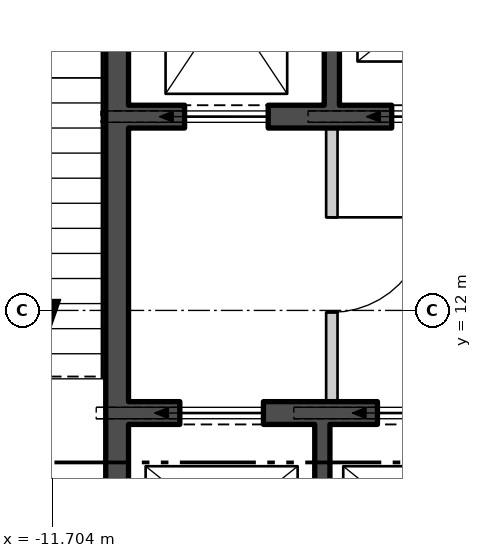
"""IFC4 building model, lengths in metres.
Left out: names, types, materials, properties, quantities, classifications, styles, units other than length and angle.
Written with IfcOpenShell. Run it as: python <this file> out.ifc"""

import sys

from ifc_helpers import new_model, si_unit, direction, frame, frame_2d, origin, place, context, subcontext, project, spatial, polyline, rectangle, outline, extrude, element, fill, save


model = new_model("IFC4")
c1 = context("Model", 3, precision=1e-05, world=origin(), true_north=direction((0.0, 1.0)))
c2 = subcontext(c1, "Body", "Model", "MODEL_VIEW")
j1 = project(units=[si_unit("LENGTHUNIT", "METRE"), si_unit("PLANEANGLEUNIT", "RADIAN")], contexts=[c1])
p1 = place(None, origin())
s1 = spatial("IfcSite", under=j1, at=p1, CompositionType="ELEMENT")
p2 = place(p1, origin())
s2 = spatial("IfcBuilding", under=s1, at=p2, CompositionType="ELEMENT")
p3 = place(p2, frame((0.0, 0.0, 163.2)))
s3 = spatial("IfcBuildingStorey", under=s2, at=p3, CompositionType="ELEMENT", Elevation=163.2)
p4 = place(p3, frame((-26.925, 12.951, -0.18), z_axis=(0.0, 0.0, 1.0), x_axis=(0.499999764979, -0.866025539474, 0.0)))
e1 = element("IfcWall", 1, at=p4, inside=s3, PredefinedType="SOLIDWALL", context=c2, shape_type="SweptSolid", body=[
    extrude(outline(polyline([(-0.13, -0.225), (45.87, -0.225), (45.61, 0.225), (0.13, 0.225), (-0.13, -0.225)])), origin(), (0.0, 0.0, 1.0), 3.68),
])
p5 = place(p4, frame((1.424, 0.0, 1.08)))
e2 = element("IfcOpeningElement", 2, at=p5, cuts=e1, PredefinedType="OPENING", context=c2, shape_type="SweptSolid", body=[
    extrude(rectangle(XDim=2.4, YDim=2.0, at=frame_2d((1.2, 1.0))), frame((0.0, 0.235, 0.0), z_axis=(0.0, -1.0, 0.0), x_axis=(1.0, 0.0, 0.0)), (0.0, 0.0, 1.0), 0.47),
])
p6 = place(p4, frame((5.893, 0.0, 1.08)))
e3 = element("IfcOpeningElement", 3, at=p6, cuts=e1, PredefinedType="OPENING", context=c2, shape_type="SweptSolid", body=[
    extrude(rectangle(XDim=2.4, YDim=2.0, at=frame_2d((1.2, 1.0))), frame((0.0, 0.235, 0.0), z_axis=(0.0, -1.0, 0.0), x_axis=(1.0, 0.0, 0.0)), (0.0, 0.0, 1.0), 0.47),
])
p7 = place(p4, frame((10.401, 0.0, 1.08)))
e4 = element("IfcOpeningElement", 4, at=p7, cuts=e1, PredefinedType="OPENING", context=c2, shape_type="SweptSolid", body=[
    extrude(rectangle(XDim=2.4, YDim=2.0, at=frame_2d((1.2, 1.0))), frame((0.0, 0.235, 0.0), z_axis=(0.0, -1.0, 0.0), x_axis=(1.0, 0.0, 0.0)), (0.0, 0.0, 1.0), 0.47),
])
p8 = place(p4, frame((14.909, 0.0, 1.08)))
e5 = element("IfcOpeningElement", 5, at=p8, cuts=e1, PredefinedType="OPENING", context=c2, shape_type="SweptSolid", body=[
    extrude(rectangle(XDim=2.4, YDim=2.0, at=frame_2d((1.2, 1.0))), frame((0.0, 0.235, 0.0), z_axis=(0.0, -1.0, 0.0), x_axis=(1.0, 0.0, 0.0)), (0.0, 0.0, 1.0), 0.47),
])
p9 = place(p4, frame((19.416, 0.0, 1.08)))
e6 = element("IfcOpeningElement", 6, at=p9, cuts=e1, PredefinedType="OPENING", context=c2, shape_type="SweptSolid", body=[
    extrude(rectangle(XDim=2.4, YDim=2.0, at=frame_2d((1.2, 1.0))), frame((0.0, 0.235, 0.0), z_axis=(0.0, -1.0, 0.0), x_axis=(1.0, 0.0, 0.0)), (0.0, 0.0, 1.0), 0.47),
])
p10 = place(p4, frame((23.924, 0.0, 1.08)))
e7 = element("IfcOpeningElement", 7, at=p10, cuts=e1, PredefinedType="OPENING", context=c2, shape_type="SweptSolid", body=[
    extrude(rectangle(XDim=2.4, YDim=2.0, at=frame_2d((1.2, 1.0))), frame((0.0, 0.235, 0.0), z_axis=(0.0, -1.0, 0.0), x_axis=(1.0, 0.0, 0.0)), (0.0, 0.0, 1.0), 0.47),
])
p11 = place(p4, frame((28.431, 0.0, 1.08)))
e8 = element("IfcOpeningElement", 8, at=p11, cuts=e1, PredefinedType="OPENING", context=c2, shape_type="SweptSolid", body=[
    extrude(rectangle(XDim=2.4, YDim=2.0, at=frame_2d((1.2, 1.0))), frame((0.0, 0.235, 0.0), z_axis=(0.0, -1.0, 0.0), x_axis=(1.0, 0.0, 0.0)), (0.0, 0.0, 1.0), 0.47),
])
p12 = place(p4, frame((32.939, 0.0, 1.08)))
e9 = element("IfcOpeningElement", 9, at=p12, cuts=e1, PredefinedType="OPENING", context=c2, shape_type="SweptSolid", body=[
    extrude(rectangle(XDim=2.4, YDim=2.0, at=frame_2d((1.2, 1.0))), frame((0.0, 0.235, 0.0), z_axis=(0.0, -1.0, 0.0), x_axis=(1.0, 0.0, 0.0)), (0.0, 0.0, 1.0), 0.47),
])
p13 = place(p4, frame((37.447, 0.0, 1.08)))
e10 = element("IfcOpeningElement", 10, at=p13, cuts=e1, PredefinedType="OPENING", context=c2, shape_type="SweptSolid", body=[
    extrude(rectangle(XDim=2.4, YDim=2.0, at=frame_2d((1.2, 1.0))), frame((0.0, 0.235, 0.0), z_axis=(0.0, -1.0, 0.0), x_axis=(1.0, 0.0, 0.0)), (0.0, 0.0, 1.0), 0.47),
])
p14 = place(p4, frame((41.916, 0.0, 1.08)))
e11 = element("IfcOpeningElement", 11, at=p14, cuts=e1, PredefinedType="OPENING", context=c2, shape_type="SweptSolid", body=[
    extrude(rectangle(XDim=2.4, YDim=2.0, at=frame_2d((1.2, 1.0))), frame((0.0, 0.235, 0.0), z_axis=(0.0, -1.0, 0.0), x_axis=(1.0, 0.0, 0.0)), (0.0, 0.0, 1.0), 0.47),
])
p15 = place(p3, frame((-10.85, 2.5, 0.0), z_axis=(0.0, 0.0, 1.0), x_axis=(0.0, 1.0, 0.0)))
e12 = element("IfcWall", 12, at=p15, inside=s3, PredefinedType="SHEAR", context=c2, shape_type="SweptSolid", body=[
    extrude(rectangle(XDim=15.0, YDim=0.3, at=frame_2d((7.5, 0.0))), origin(), (0.0, 0.0, 1.0), 3.7),
])
p16 = place(p15, frame((3.475, 0.0, 0.0)))
e13 = element("IfcOpeningElement", 13, at=p16, cuts=e12, PredefinedType="OPENING", context=c2, shape_type="SweptSolid", body=[
    extrude(rectangle(XDim=1.25, YDim=2.1, at=frame_2d((0.625, 1.05))), frame((0.0, 0.16, 0.0), z_axis=(0.0, -1.0, 0.0), x_axis=(1.0, 0.0, 0.0)), (0.0, 0.0, 1.0), 0.32),
])
p17 = place(p15, frame((1.125, 0.0, 0.0)))
e14 = element("IfcOpeningElement", 14, at=p17, cuts=e12, PredefinedType="OPENING", context=c2, shape_type="SweptSolid", body=[
    extrude(rectangle(XDim=1.0, YDim=2.1, at=frame_2d((0.5, 1.05))), frame((0.0, 0.16, 0.0), z_axis=(0.0, -1.0, 0.0), x_axis=(1.0, 0.0, 0.0)), (0.0, 0.0, 1.0), 0.32),
])
p18 = place(p3, frame((-10.7, 14.55, 0.0), z_axis=(0.0, 0.0, 1.0), x_axis=(1.0, 0.0, 0.0)))
e15 = element("IfcWall", 15, at=p18, inside=s3, PredefinedType="SHEAR", context=c2, shape_type="SweptSolid", body=[
    extrude(rectangle(XDim=21.4, YDim=0.3, at=frame_2d((10.7, 0.0))), origin(), (0.0, 0.0, 1.0), 3.7),
])
p19 = place(p18, frame((0.738, 0.0, 0.0)))
e16 = element("IfcOpeningElement", 16, at=p19, cuts=e15, PredefinedType="OPENING", context=c2, shape_type="SweptSolid", body=[
    extrude(rectangle(XDim=1.1, YDim=2.1, at=frame_2d((0.55, 1.05))), frame((0.0, 0.16, 0.0), z_axis=(0.0, -1.0, 0.0), x_axis=(1.0, 0.0, 0.0)), (0.0, 0.0, 1.0), 0.32),
])
p20 = place(p18, frame((3.462, 0.0, 0.0)))
e17 = element("IfcOpeningElement", 17, at=p20, cuts=e15, PredefinedType="OPENING", context=c2, shape_type="SweptSolid", body=[
    extrude(rectangle(XDim=1.1, YDim=2.1, at=frame_2d((0.55, 1.05))), frame((0.0, 0.16, 0.0), z_axis=(0.0, -1.0, 0.0), x_axis=(1.0, 0.0, 0.0)), (0.0, 0.0, 1.0), 0.32),
])
p21 = place(p18, frame((6.138, 0.0, 0.0)))
e18 = element("IfcOpeningElement", 18, at=p21, cuts=e15, PredefinedType="OPENING", context=c2, shape_type="SweptSolid", body=[
    extrude(rectangle(XDim=1.1, YDim=2.1, at=frame_2d((0.55, 1.05))), frame((0.0, 0.16, 0.0), z_axis=(0.0, -1.0, 0.0), x_axis=(1.0, 0.0, 0.0)), (0.0, 0.0, 1.0), 0.32),
])
p22 = place(p18, frame((8.812, 0.0, 0.0)))
e19 = element("IfcOpeningElement", 19, at=p22, cuts=e15, PredefinedType="OPENING", context=c2, shape_type="SweptSolid", body=[
    extrude(rectangle(XDim=1.1, YDim=2.1, at=frame_2d((0.55, 1.05))), frame((0.0, 0.16, 0.0), z_axis=(0.0, -1.0, 0.0), x_axis=(1.0, 0.0, 0.0)), (0.0, 0.0, 1.0), 0.32),
])
p23 = place(p18, frame((19.562, 0.0, 0.0)))
e20 = element("IfcOpeningElement", 20, at=p23, cuts=e15, PredefinedType="OPENING", context=c2, shape_type="SweptSolid", body=[
    extrude(rectangle(XDim=1.1, YDim=2.1, at=frame_2d((0.55, 1.05))), frame((0.0, 0.16, 0.0), z_axis=(0.0, -1.0, 0.0), x_axis=(1.0, 0.0, 0.0)), (0.0, 0.0, 1.0), 0.32),
])
p24 = place(p18, frame((12.875, 0.0, 0.0)))
e21 = element("IfcOpeningElement", 21, at=p24, cuts=e15, PredefinedType="OPENING", context=c2, shape_type="SweptSolid", body=[
    extrude(rectangle(XDim=1.0, YDim=2.1, at=frame_2d((0.5, 1.05))), frame((0.0, 0.16, 0.0), z_axis=(0.0, -1.0, 0.0), x_axis=(1.0, 0.0, 0.0)), (0.0, 0.0, 1.0), 0.32),
])
p25 = place(p18, frame((16.887, 0.0, 0.0)))
e22 = element("IfcOpeningElement", 22, at=p25, cuts=e15, PredefinedType="OPENING", context=c2, shape_type="SweptSolid", body=[
    extrude(rectangle(XDim=1.0, YDim=2.1, at=frame_2d((0.5, 1.05))), frame((0.0, 0.16, 0.0), z_axis=(0.0, -1.0, 0.0), x_axis=(1.0, 0.0, 0.0)), (0.0, 0.0, 1.0), 0.32),
])
p26 = place(p3, frame((-10.7, 10.65, 0.0), z_axis=(0.0, 0.0, 1.0), x_axis=(1.0, 0.0, 0.0)))
e23 = element("IfcWall", 23, at=p26, inside=s3, PredefinedType="SHEAR", context=c2, shape_type="SweptSolid", body=[
    extrude(rectangle(XDim=10.3, YDim=0.3, at=frame_2d((5.15, 0.0))), origin(), (0.0, 0.0, 1.0), 3.7),
])
p27 = place(p26, frame((0.675, 0.0, 0.0)))
e24 = element("IfcOpeningElement", 24, at=p27, cuts=e23, PredefinedType="OPENING", context=c2, shape_type="SweptSolid", body=[
    extrude(rectangle(XDim=1.1, YDim=2.1, at=frame_2d((0.55, 1.05))), frame((0.0, 0.16, 0.0), z_axis=(0.0, -1.0, 0.0), x_axis=(1.0, 0.0, 0.0)), (0.0, 0.0, 1.0), 0.32),
])
p28 = place(p26, frame((3.275, 0.0, 0.0)))
e25 = element("IfcOpeningElement", 25, at=p28, cuts=e23, PredefinedType="OPENING", context=c2, shape_type="SweptSolid", body=[
    extrude(rectangle(XDim=1.1, YDim=2.1, at=frame_2d((0.55, 1.05))), frame((0.0, 0.16, 0.0), z_axis=(0.0, -1.0, 0.0), x_axis=(1.0, 0.0, 0.0)), (0.0, 0.0, 1.0), 0.32),
])
p29 = place(p26, frame((5.825, 0.0, 0.0)))
e26 = element("IfcOpeningElement", 26, at=p29, cuts=e23, PredefinedType="OPENING", context=c2, shape_type="SweptSolid", body=[
    extrude(rectangle(XDim=1.1, YDim=2.1, at=frame_2d((0.55, 1.05))), frame((0.0, 0.16, 0.0), z_axis=(0.0, -1.0, 0.0), x_axis=(1.0, 0.0, 0.0)), (0.0, 0.0, 1.0), 0.32),
])
p30 = place(p26, frame((8.425, 0.0, 0.0)))
e27 = element("IfcOpeningElement", 27, at=p30, cuts=e23, PredefinedType="OPENING", context=c2, shape_type="SweptSolid", body=[
    extrude(rectangle(XDim=1.0, YDim=2.1, at=frame_2d((0.5, 1.05))), frame((0.0, 0.16, 0.0), z_axis=(0.0, -1.0, 0.0), x_axis=(1.0, 0.0, 0.0)), (0.0, 0.0, 1.0), 0.32),
])
p31 = place(p3, frame((-8.025, 14.7, 0.0), z_axis=(0.0, 0.0, 1.0), x_axis=(0.0, 1.0, 0.0)))
e28 = element("IfcWall", 28, at=p31, inside=s3, PredefinedType="SHEAR", context=c2, shape_type="SweptSolid", body=[
    extrude(rectangle(XDim=2.8, YDim=0.2, at=frame_2d((1.4, 0.0))), origin(), (0.0, 0.0, 1.0), 3.7),
])
p32 = place(p3, frame((-8.15, 7.8, 0.0), z_axis=(0.0, 0.0, 1.0), x_axis=(0.0, 1.0, 0.0)))
e29 = element("IfcWall", 29, at=p32, inside=s3, PredefinedType="SHEAR", context=c2, shape_type="SweptSolid", body=[
    extrude(rectangle(XDim=2.7, YDim=0.2, at=frame_2d((1.35, 0.0))), origin(), (0.0, 0.0, 1.0), 3.7),
])
p33 = place(p3, frame((-8.025, 10.8, 0.0), z_axis=(0.0, 0.0, 1.0), x_axis=(0.0, 1.0, 0.0)))
e30 = element("IfcWall", 30, at=p33, inside=s3, PredefinedType="PARTITIONING", context=c2, shape_type="SweptSolid", body=[
    extrude(rectangle(XDim=3.6, YDim=0.15, at=frame_2d((1.8, 0.0))), origin(), (0.0, 0.0, 1.0), 3.7),
])
p34 = place(p33, frame((1.175, 0.0, 0.0)))
e31 = element("IfcOpeningElement", 31, at=p34, cuts=e30, PredefinedType="OPENING", context=c2, shape_type="SweptSolid", body=[
    extrude(rectangle(XDim=1.25, YDim=2.1, at=frame_2d((0.625, 1.05))), frame((0.0, 0.085, 0.0), z_axis=(0.0, -1.0, 0.0), x_axis=(1.0, 0.0, 0.0)), (0.0, 0.0, 1.0), 0.17),
])
p35 = place(p19, origin())
e32 = element("IfcDoor", 32, at=p35, inside=s3, OperationType="SLIDING_TO_LEFT", PredefinedType="DOOR", context=c2, shape_type="SweptSolid", body=[
    extrude(rectangle(XDim=1.1, YDim=2.1, at=frame_2d((0.55, 1.05))), frame((0.0, 0.025, 0.0), z_axis=(0.0, -1.0, 0.0), x_axis=(1.0, 0.0, 0.0)), (0.0, 0.0, 1.0), 0.05),
])
fill(e16, e32)
p36 = place(p20, origin())
e33 = element("IfcDoor", 33, at=p36, inside=s3, OperationType="SLIDING_TO_LEFT", PredefinedType="DOOR", context=c2, shape_type="SweptSolid", body=[
    extrude(rectangle(XDim=1.1, YDim=2.1, at=frame_2d((0.55, 1.05))), frame((0.0, 0.025, 0.0), z_axis=(0.0, -1.0, 0.0), x_axis=(1.0, 0.0, 0.0)), (0.0, 0.0, 1.0), 0.05),
])
fill(e17, e33)
p37 = place(p27, origin())
e34 = element("IfcDoor", 34, at=p37, inside=s3, OperationType="SLIDING_TO_LEFT", PredefinedType="DOOR", context=c2, shape_type="SweptSolid", body=[
    extrude(rectangle(XDim=1.1, YDim=2.1, at=frame_2d((0.55, 1.05))), frame((0.0, 0.025, 0.0), z_axis=(0.0, -1.0, 0.0), x_axis=(1.0, 0.0, 0.0)), (0.0, 0.0, 1.0), 0.05),
])
fill(e24, e34)
p38 = place(p28, origin())
e35 = element("IfcDoor", 35, at=p38, inside=s3, OperationType="SLIDING_TO_LEFT", PredefinedType="DOOR", context=c2, shape_type="SweptSolid", body=[
    extrude(rectangle(XDim=1.1, YDim=2.1, at=frame_2d((0.55, 1.05))), frame((0.0, 0.025, 0.0), z_axis=(0.0, -1.0, 0.0), x_axis=(1.0, 0.0, 0.0)), (0.0, 0.0, 1.0), 0.05),
])
fill(e25, e35)
p39 = place(p34, origin())
e36 = element("IfcDoor", 36, at=p39, inside=s3, OperationType="SINGLE_SWING_RIGHT", PredefinedType="DOOR", context=c2, shape_type="SweptSolid", body=[
    extrude(rectangle(XDim=1.25, YDim=2.1, at=frame_2d((0.625, 1.05))), frame((0.0, 0.025, 0.0), z_axis=(0.0, -1.0, 0.0), x_axis=(1.0, 0.0, 0.0)), (0.0, 0.0, 1.0), 0.05),
])
fill(e31, e36)
save(model, sys.argv[1])
